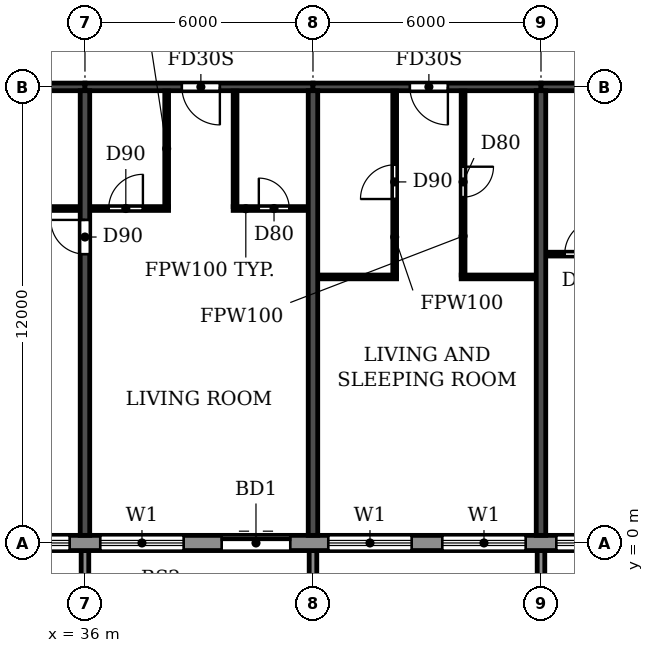
"""IFC4 building model, lengths in metres.
Left out: names, types, materials, properties, quantities, classifications, styles, units other than length and angle.
Written with IfcOpenShell. Run it as: python <this file> out.ifc"""

import sys

from ifc_helpers import new_model, si_unit, direction, frame, frame_2d, origin, place, context, subcontext, project, spatial, polyline, rectangle, outline, extrude, source, transform, mapped, element, fill, save


model = new_model("IFC4")
c1 = context("Model", 3, precision=1e-05, world=origin(), true_north=direction((0.0, 1.0)))
c2 = subcontext(c1, "Body", "Model", "MODEL_VIEW")
j1 = project(units=[si_unit("LENGTHUNIT", "METRE"), si_unit("PLANEANGLEUNIT", "RADIAN")], contexts=[c1])
p1 = place(None, origin())
s1 = spatial("IfcSite", under=j1, at=p1, CompositionType="ELEMENT")
p2 = place(p1, origin())
s2 = spatial("IfcBuilding", under=s1, at=p2, CompositionType="ELEMENT")
p3 = place(p2, frame((0.0, 0.0, 251.1)))
s3 = spatial("IfcBuildingStorey", under=s2, at=p3, CompositionType="ELEMENT", Elevation=251.1)
p4 = place(p3, frame((36.0, 0.2, 0.0), z_axis=(0.0, 0.0, 1.0), x_axis=(0.0, 1.0, 0.0)))
e1 = element("IfcWall", 1, at=p4, inside=s3, PredefinedType="SHEAR", context=c2, shape_type="SweptSolid", body=[
    extrude(rectangle(XDim=11.7, YDim=0.25, at=frame_2d((5.85, 0.0))), origin(), (0.0, 0.0, 1.0), 3.08),
])
p5 = place(p4, frame((7.4, 0.0, 0.0)))
e2 = element("IfcOpeningElement", 2, at=p5, cuts=e1, PredefinedType="OPENING", context=c2, shape_type="SweptSolid", body=[
    extrude(rectangle(XDim=0.9, YDim=2.1, at=frame_2d((0.45, 1.05))), frame((0.0, 0.135, 0.0), z_axis=(0.0, -1.0, 0.0), x_axis=(1.0, 0.0, 0.0)), (0.0, 0.0, 1.0), 0.27),
])
for number, where, z_axis, x_axis in (
    (3, (42.0, 0.2, 0.0), (0.0, 0.0, 1.0), (0.0, 1.0, 0.0)),
    (4, (48.0, 0.2, 0.0), (0.0, 0.0, 1.0), (0.0, 1.0, 0.0)),
):
    element("IfcWall", number, at=place(p3, frame(where, z_axis=z_axis, x_axis=x_axis)), inside=s3, PredefinedType="SHEAR", context=c2, shape_type="SweptSolid", body=[
        extrude(rectangle(XDim=11.7, YDim=0.25, at=frame_2d((5.85, 0.0))), origin(), (0.0, 0.0, 1.0), 3.08),
    ])
p6 = place(p3, frame((30.0, 12.0, 0.0), z_axis=(0.0, 0.0, 1.0), x_axis=(1.0, 0.0, 0.0)))
e5 = element("IfcWall", 5, at=p6, inside=s3, PredefinedType="SHEAR", context=c2, shape_type="SweptSolid", body=[
    extrude(rectangle(XDim=6.0, YDim=0.2, at=frame_2d((3.0, 0.0))), origin(), (0.0, 0.0, 1.0), 2.48),
])
p7 = place(p3, frame((36.0, 12.0, 0.0), z_axis=(0.0, 0.0, 1.0), x_axis=(1.0, 0.0, 0.0)))
e6 = element("IfcWall", 6, at=p7, inside=s3, PredefinedType="SHEAR", context=c2, shape_type="SweptSolid", body=[
    extrude(rectangle(XDim=6.0, YDim=0.2, at=frame_2d((3.0, 0.0))), origin(), (0.0, 0.0, 1.0), 2.48),
])
p8 = place(p7, frame((2.55, 0.0, 0.0)))
e7 = element("IfcOpeningElement", 7, at=p8, cuts=e6, PredefinedType="OPENING", context=c2, shape_type="SweptSolid", body=[
    extrude(rectangle(XDim=1.0, YDim=2.1, at=frame_2d((0.5, 1.05))), frame((0.0, 0.11, 0.0), z_axis=(0.0, -1.0, 0.0), x_axis=(1.0, 0.0, 0.0)), (0.0, 0.0, 1.0), 0.22),
])
p9 = place(p3, frame((42.0, 12.0, 0.0), z_axis=(0.0, 0.0, 1.0), x_axis=(1.0, 0.0, 0.0)))
e8 = element("IfcWall", 8, at=p9, inside=s3, PredefinedType="SHEAR", context=c2, shape_type="SweptSolid", body=[
    extrude(rectangle(XDim=6.0, YDim=0.2, at=frame_2d((3.0, 0.0))), origin(), (0.0, 0.0, 1.0), 2.48),
])
p10 = place(p9, frame((2.55, 0.0, 0.0)))
e9 = element("IfcOpeningElement", 9, at=p10, cuts=e8, PredefinedType="OPENING", context=c2, shape_type="SweptSolid", body=[
    extrude(rectangle(XDim=1.0, YDim=2.1, at=frame_2d((0.5, 1.05))), frame((0.0, 0.11, 0.0), z_axis=(0.0, -1.0, 0.0), x_axis=(1.0, 0.0, 0.0)), (0.0, 0.0, 1.0), 0.22),
])
p11 = place(p3, frame((48.0, 12.0, 0.0), z_axis=(0.0, 0.0, 1.0), x_axis=(1.0, 0.0, 0.0)))
e10 = element("IfcWall", 10, at=p11, inside=s3, PredefinedType="SHEAR", context=c2, shape_type="SweptSolid", body=[
    extrude(rectangle(XDim=6.0, YDim=0.2, at=frame_2d((3.0, 0.0))), origin(), (0.0, 0.0, 1.0), 2.48),
])
p12 = place(p11, frame((2.55, 0.0, 0.0)))
e11 = element("IfcOpeningElement", 11, at=p12, cuts=e10, PredefinedType="OPENING", context=c2, shape_type="SweptSolid", body=[
    extrude(rectangle(XDim=1.0, YDim=2.1, at=frame_2d((0.5, 1.05))), frame((0.0, 0.11, 0.0), z_axis=(0.0, -1.0, 0.0), x_axis=(1.0, 0.0, 0.0)), (0.0, 0.0, 1.0), 0.22),
])
p13 = place(p3, frame((22.683, 0.0, 0.0), z_axis=(0.0, 0.0, 1.0), x_axis=(1.0, 0.0, 0.0)))
e12 = element("IfcWall", 12, at=p13, inside=s3, PredefinedType="STANDARD", context=c2, shape_type="SweptSolid", body=[
    extrude(rectangle(XDim=56.634, YDim=0.4, at=frame_2d((28.317, 0.0))), origin(), (0.0, 0.0, 1.0), 3.08),
])
p14 = place(p13, frame((1.717, 0.0, 0.9)))
e13 = element("IfcOpeningElement", 13, at=p14, cuts=e12, PredefinedType="OPENING", context=c2, shape_type="SweptSolid", body=[
    extrude(rectangle(XDim=2.2, YDim=1.5, at=frame_2d((1.1, 0.75))), frame((0.0, 0.21, 0.0), z_axis=(0.0, -1.0, 0.0), x_axis=(1.0, 0.0, 0.0)), (0.0, 0.0, 1.0), 0.42),
])
p15 = place(p13, frame((4.917, 0.0, 0.0)))
e14 = element("IfcOpeningElement", 14, at=p15, cuts=e12, PredefinedType="OPENING", context=c2, shape_type="SweptSolid", body=[
    extrude(rectangle(XDim=1.8, YDim=2.4, at=frame_2d((0.9, 1.2))), frame((0.0, 0.21, 0.0), z_axis=(0.0, -1.0, 0.0), x_axis=(1.0, 0.0, 0.0)), (0.0, 0.0, 1.0), 0.42),
])
p16 = place(p13, frame((7.717, 0.0, 0.9)))
e15 = element("IfcOpeningElement", 15, at=p16, cuts=e12, PredefinedType="OPENING", context=c2, shape_type="SweptSolid", body=[
    extrude(rectangle(XDim=2.2, YDim=1.5, at=frame_2d((1.1, 0.75))), frame((0.0, 0.21, 0.0), z_axis=(0.0, -1.0, 0.0), x_axis=(1.0, 0.0, 0.0)), (0.0, 0.0, 1.0), 0.42),
])
p17 = place(p13, frame((10.717, 0.0, 0.9)))
e16 = element("IfcOpeningElement", 16, at=p17, cuts=e12, PredefinedType="OPENING", context=c2, shape_type="SweptSolid", body=[
    extrude(rectangle(XDim=2.2, YDim=1.5, at=frame_2d((1.1, 0.75))), frame((0.0, 0.21, 0.0), z_axis=(0.0, -1.0, 0.0), x_axis=(1.0, 0.0, 0.0)), (0.0, 0.0, 1.0), 0.42),
])
p18 = place(p13, frame((13.717, 0.0, 0.9)))
e17 = element("IfcOpeningElement", 17, at=p18, cuts=e12, PredefinedType="OPENING", context=c2, shape_type="SweptSolid", body=[
    extrude(rectangle(XDim=2.2, YDim=1.5, at=frame_2d((1.1, 0.75))), frame((0.0, 0.21, 0.0), z_axis=(0.0, -1.0, 0.0), x_axis=(1.0, 0.0, 0.0)), (0.0, 0.0, 1.0), 0.42),
])
p19 = place(p13, frame((16.917, 0.0, 0.0)))
e18 = element("IfcOpeningElement", 18, at=p19, cuts=e12, PredefinedType="OPENING", context=c2, shape_type="SweptSolid", body=[
    extrude(rectangle(XDim=1.8, YDim=2.4, at=frame_2d((0.9, 1.2))), frame((0.0, 0.21, 0.0), z_axis=(0.0, -1.0, 0.0), x_axis=(1.0, 0.0, 0.0)), (0.0, 0.0, 1.0), 0.42),
])
p20 = place(p13, frame((19.717, 0.0, 0.9)))
e19 = element("IfcOpeningElement", 19, at=p20, cuts=e12, PredefinedType="OPENING", context=c2, shape_type="SweptSolid", body=[
    extrude(rectangle(XDim=2.2, YDim=1.5, at=frame_2d((1.1, 0.75))), frame((0.0, 0.21, 0.0), z_axis=(0.0, -1.0, 0.0), x_axis=(1.0, 0.0, 0.0)), (0.0, 0.0, 1.0), 0.42),
])
p21 = place(p13, frame((22.717, 0.0, 0.9)))
e20 = element("IfcOpeningElement", 20, at=p21, cuts=e12, PredefinedType="OPENING", context=c2, shape_type="SweptSolid", body=[
    extrude(rectangle(XDim=2.2, YDim=1.5, at=frame_2d((1.1, 0.75))), frame((0.0, 0.21, 0.0), z_axis=(0.0, -1.0, 0.0), x_axis=(1.0, 0.0, 0.0)), (0.0, 0.0, 1.0), 0.42),
])
p22 = place(p13, frame((25.717, 0.0, 0.9)))
e21 = element("IfcOpeningElement", 21, at=p22, cuts=e12, PredefinedType="OPENING", context=c2, shape_type="SweptSolid", body=[
    extrude(rectangle(XDim=2.2, YDim=1.5, at=frame_2d((1.1, 0.75))), frame((0.0, 0.21, 0.0), z_axis=(0.0, -1.0, 0.0), x_axis=(1.0, 0.0, 0.0)), (0.0, 0.0, 1.0), 0.42),
])
p23 = place(p13, frame((28.917, 0.0, 0.0)))
e22 = element("IfcOpeningElement", 22, at=p23, cuts=e12, PredefinedType="OPENING", context=c2, shape_type="SweptSolid", body=[
    extrude(rectangle(XDim=1.8, YDim=2.4, at=frame_2d((0.9, 1.2))), frame((0.0, 0.21, 0.0), z_axis=(0.0, -1.0, 0.0), x_axis=(1.0, 0.0, 0.0)), (0.0, 0.0, 1.0), 0.42),
])
p24 = place(p13, frame((31.717, 0.0, 0.9)))
e23 = element("IfcOpeningElement", 23, at=p24, cuts=e12, PredefinedType="OPENING", context=c2, shape_type="SweptSolid", body=[
    extrude(rectangle(XDim=2.2, YDim=1.5, at=frame_2d((1.1, 0.75))), frame((0.0, 0.21, 0.0), z_axis=(0.0, -1.0, 0.0), x_axis=(1.0, 0.0, 0.0)), (0.0, 0.0, 1.0), 0.42),
])
p25 = place(p13, frame((34.717, 0.0, 0.9)))
e24 = element("IfcOpeningElement", 24, at=p25, cuts=e12, PredefinedType="OPENING", context=c2, shape_type="SweptSolid", body=[
    extrude(rectangle(XDim=2.2, YDim=1.5, at=frame_2d((1.1, 0.75))), frame((0.0, 0.21, 0.0), z_axis=(0.0, -1.0, 0.0), x_axis=(1.0, 0.0, 0.0)), (0.0, 0.0, 1.0), 0.42),
])
p26 = place(p13, frame((37.717, 0.0, 0.9)))
e25 = element("IfcOpeningElement", 25, at=p26, cuts=e12, PredefinedType="OPENING", context=c2, shape_type="SweptSolid", body=[
    extrude(rectangle(XDim=2.2, YDim=1.5, at=frame_2d((1.1, 0.75))), frame((0.0, 0.21, 0.0), z_axis=(0.0, -1.0, 0.0), x_axis=(1.0, 0.0, 0.0)), (0.0, 0.0, 1.0), 0.42),
])
p27 = place(p13, frame((40.917, 0.0, 0.0)))
e26 = element("IfcOpeningElement", 26, at=p27, cuts=e12, PredefinedType="OPENING", context=c2, shape_type="SweptSolid", body=[
    extrude(rectangle(XDim=1.8, YDim=2.4, at=frame_2d((0.9, 1.2))), frame((0.0, 0.21, 0.0), z_axis=(0.0, -1.0, 0.0), x_axis=(1.0, 0.0, 0.0)), (0.0, 0.0, 1.0), 0.42),
])
p28 = place(p13, frame((43.717, 0.0, 0.9)))
e27 = element("IfcOpeningElement", 27, at=p28, cuts=e12, PredefinedType="OPENING", context=c2, shape_type="SweptSolid", body=[
    extrude(rectangle(XDim=2.2, YDim=1.5, at=frame_2d((1.1, 0.75))), frame((0.0, 0.21, 0.0), z_axis=(0.0, -1.0, 0.0), x_axis=(1.0, 0.0, 0.0)), (0.0, 0.0, 1.0), 0.42),
])
p29 = place(p13, frame((46.717, 0.0, 0.9)))
e28 = element("IfcOpeningElement", 28, at=p29, cuts=e12, PredefinedType="OPENING", context=c2, shape_type="SweptSolid", body=[
    extrude(rectangle(XDim=2.2, YDim=1.5, at=frame_2d((1.1, 0.75))), frame((0.0, 0.21, 0.0), z_axis=(0.0, -1.0, 0.0), x_axis=(1.0, 0.0, 0.0)), (0.0, 0.0, 1.0), 0.42),
])
p30 = place(p13, frame((49.717, 0.0, 0.9)))
e29 = element("IfcOpeningElement", 29, at=p30, cuts=e12, PredefinedType="OPENING", context=c2, shape_type="SweptSolid", body=[
    extrude(rectangle(XDim=2.2, YDim=1.5, at=frame_2d((1.1, 0.75))), frame((0.0, 0.21, 0.0), z_axis=(0.0, -1.0, 0.0), x_axis=(1.0, 0.0, 0.0)), (0.0, 0.0, 1.0), 0.42),
])
p31 = place(p13, frame((52.917, 0.0, 0.0)))
e30 = element("IfcOpeningElement", 30, at=p31, cuts=e12, PredefinedType="OPENING", context=c2, shape_type="SweptSolid", body=[
    extrude(rectangle(XDim=1.8, YDim=2.4, at=frame_2d((0.9, 1.2))), frame((0.0, 0.21, 0.0), z_axis=(0.0, -1.0, 0.0), x_axis=(1.0, 0.0, 0.0)), (0.0, 0.0, 1.0), 0.42),
])
m1 = source(origin(), c2, "Body", "SweptSolid", [
    extrude(outline(polyline([(0.0, 0.0), (0.2, 0.0), (0.2, 1.65), (0.0, 1.65), (0.0, 0.0)])), origin(), (0.0, 0.0, 1.0), 3.1),
])
for number, where in (
    (31, (35.9, -1.85, 0.0)),
    (32, (41.9, -1.85, 0.0)),
    (33, (47.9, -1.85, 0.0)),
):
    element("IfcWall", number, at=place(p3, frame(where)), inside=s3, PredefinedType="STANDARD", context=c2, shape_type="MappedRepresentation", body=[
        mapped(m1, transform((0.0, 0.0, 0.0))),
    ])
p32 = place(p3, frame((42.135, 7.0, 0.0), z_axis=(0.0, 0.0, 1.0), x_axis=(1.0, 0.0, 0.0)))
e34 = element("IfcWall", 34, at=p32, inside=s3, PredefinedType="PARTITIONING", context=c2, shape_type="SweptSolid", body=[
    extrude(rectangle(XDim=2.065, YDim=0.1, at=frame_2d((1.032, 0.0))), origin(), (0.0, 0.0, 1.0), 3.08),
])
p33 = place(p3, frame((45.9, 7.0, 0.0), z_axis=(0.0, 0.0, 1.0), x_axis=(1.0, 0.0, 0.0)))
e35 = element("IfcWall", 35, at=p33, inside=s3, PredefinedType="PARTITIONING", context=c2, shape_type="SweptSolid", body=[
    extrude(rectangle(XDim=1.965, YDim=0.1, at=frame_2d((0.982, 0.0))), origin(), (0.0, 0.0, 1.0), 3.08),
])
p34 = place(p3, frame((48.135, 7.6, 0.0), z_axis=(0.0, 0.0, 1.0), x_axis=(1.0, 0.0, 0.0)))
e36 = element("IfcWall", 36, at=p34, inside=s3, PredefinedType="PARTITIONING", context=c2, shape_type="SweptSolid", body=[
    extrude(rectangle(XDim=2.065, YDim=0.1, at=frame_2d((1.032, 0.0))), origin(), (0.0, 0.0, 1.0), 3.08),
])
p35 = place(p34, frame((0.49, 0.0, 0.0)))
e37 = element("IfcOpeningElement", 37, at=p35, cuts=e36, PredefinedType="OPENING", context=c2, shape_type="SweptSolid", body=[
    extrude(rectangle(XDim=0.9, YDim=2.1, at=frame_2d((0.45, 1.05))), frame((0.0, 0.06, 0.0), z_axis=(0.0, -1.0, 0.0), x_axis=(1.0, 0.0, 0.0)), (0.0, 0.0, 1.0), 0.12),
])
p36 = place(p3, frame((33.1, 8.8, 0.0), z_axis=(0.0, 0.0, 1.0), x_axis=(1.0, 0.0, 0.0)))
e38 = element("IfcWall", 38, at=p36, inside=s3, PredefinedType="PARTITIONING", context=c2, shape_type="SweptSolid", body=[
    extrude(rectangle(XDim=2.765, YDim=0.1, at=frame_2d((1.382, 0.0))), origin(), (0.0, 0.0, 1.0), 3.08),
])
p37 = place(p36, frame((1.0, 0.0, 0.0)))
e39 = element("IfcOpeningElement", 39, at=p37, cuts=e38, PredefinedType="OPENING", context=c2, shape_type="SweptSolid", body=[
    extrude(rectangle(XDim=0.8, YDim=2.1, at=frame_2d((0.4, 1.05))), frame((0.0, 0.06, 0.0), z_axis=(0.0, -1.0, 0.0), x_axis=(1.0, 0.0, 0.0)), (0.0, 0.0, 1.0), 0.12),
])
p38 = place(p3, frame((36.135, 8.8, 0.0), z_axis=(0.0, 0.0, 1.0), x_axis=(1.0, 0.0, 0.0)))
e40 = element("IfcWall", 40, at=p38, inside=s3, PredefinedType="PARTITIONING", context=c2, shape_type="SweptSolid", body=[
    extrude(rectangle(XDim=2.065, YDim=0.1, at=frame_2d((1.032, 0.0))), origin(), (0.0, 0.0, 1.0), 3.08),
])
p39 = place(p38, frame((0.49, 0.0, 0.0)))
e41 = element("IfcOpeningElement", 41, at=p39, cuts=e40, PredefinedType="OPENING", context=c2, shape_type="SweptSolid", body=[
    extrude(rectangle(XDim=0.9, YDim=2.1, at=frame_2d((0.45, 1.05))), frame((0.0, 0.06, 0.0), z_axis=(0.0, -1.0, 0.0), x_axis=(1.0, 0.0, 0.0)), (0.0, 0.0, 1.0), 0.12),
])
p40 = place(p3, frame((39.9, 8.8, 0.0), z_axis=(0.0, 0.0, 1.0), x_axis=(1.0, 0.0, 0.0)))
e42 = element("IfcWall", 42, at=p40, inside=s3, PredefinedType="PARTITIONING", context=c2, shape_type="SweptSolid", body=[
    extrude(rectangle(XDim=1.965, YDim=0.1, at=frame_2d((0.982, 0.0))), origin(), (0.0, 0.0, 1.0), 3.08),
])
p41 = place(p40, frame((0.675, 0.0, 0.0)))
e43 = element("IfcOpeningElement", 43, at=p41, cuts=e42, PredefinedType="OPENING", context=c2, shape_type="SweptSolid", body=[
    extrude(rectangle(XDim=0.8, YDim=2.1, at=frame_2d((0.4, 1.05))), frame((0.0, 0.06, 0.0), z_axis=(0.0, -1.0, 0.0), x_axis=(1.0, 0.0, 0.0)), (0.0, 0.0, 1.0), 0.12),
])
for number, where, z_axis, x_axis in (
    (44, (38.15, 8.85, 0.0), (0.0, 0.0, 1.0), (0.0, 1.0, 0.0)),
    (45, (39.95, 8.85, 0.0), (0.0, 0.0, 1.0), (0.0, 1.0, 0.0)),
):
    element("IfcWall", number, at=place(p3, frame(where, z_axis=z_axis, x_axis=x_axis)), inside=s3, PredefinedType="PARTITIONING", context=c2, shape_type="SweptSolid", body=[
        extrude(rectangle(XDim=3.04, YDim=0.1, at=frame_2d((1.52, 0.0))), origin(), (0.0, 0.0, 1.0), 3.08),
    ])
p42 = place(p3, frame((44.15, 7.05, 0.0), z_axis=(0.0, 0.0, 1.0), x_axis=(0.0, 1.0, 0.0)))
e46 = element("IfcWall", 46, at=p42, inside=s3, PredefinedType="PARTITIONING", context=c2, shape_type="SweptSolid", body=[
    extrude(rectangle(XDim=4.84, YDim=0.1, at=frame_2d((2.42, 0.0))), origin(), (0.0, 0.0, 1.0), 3.08),
])
p43 = place(p42, frame((2.0, 0.0, 0.0)))
e47 = element("IfcOpeningElement", 47, at=p43, cuts=e46, PredefinedType="OPENING", context=c2, shape_type="SweptSolid", body=[
    extrude(rectangle(XDim=0.9, YDim=2.1, at=frame_2d((0.45, 1.05))), frame((0.0, 0.06, 0.0), z_axis=(0.0, -1.0, 0.0), x_axis=(1.0, 0.0, 0.0)), (0.0, 0.0, 1.0), 0.12),
])
p44 = place(p3, frame((45.95, 7.05, 0.0), z_axis=(0.0, 0.0, 1.0), x_axis=(0.0, 1.0, 0.0)))
e48 = element("IfcWall", 48, at=p44, inside=s3, PredefinedType="PARTITIONING", context=c2, shape_type="SweptSolid", body=[
    extrude(rectangle(XDim=4.84, YDim=0.1, at=frame_2d((2.42, 0.0))), origin(), (0.0, 0.0, 1.0), 3.08),
])
p45 = place(p44, frame((2.05, 0.0, 0.0)))
e49 = element("IfcOpeningElement", 49, at=p45, cuts=e48, PredefinedType="OPENING", context=c2, shape_type="SweptSolid", body=[
    extrude(rectangle(XDim=0.8, YDim=2.1, at=frame_2d((0.4, 1.05))), frame((0.0, 0.06, 0.0), z_axis=(0.0, -1.0, 0.0), x_axis=(1.0, 0.0, 0.0)), (0.0, 0.0, 1.0), 0.12),
])
p46 = place(p17, origin())
e50 = element("IfcWindow", 50, at=p46, inside=s3, PartitioningType="DOUBLE_PANEL_HORIZONTAL", PredefinedType="WINDOW", context=c2, shape_type="SweptSolid", body=[
    extrude(rectangle(XDim=2.2, YDim=1.5, at=frame_2d((1.1, 0.75))), frame((0.0, 0.03, 0.0), z_axis=(0.0, -1.0, 0.0), x_axis=(1.0, 0.0, 0.0)), (0.0, 0.0, 1.0), 0.06),
])
fill(e16, e50)
p47 = place(p18, origin())
e51 = element("IfcWindow", 51, at=p47, inside=s3, PartitioningType="DOUBLE_PANEL_HORIZONTAL", PredefinedType="WINDOW", context=c2, shape_type="SweptSolid", body=[
    extrude(rectangle(XDim=2.2, YDim=1.5, at=frame_2d((1.1, 0.75))), frame((0.0, 0.03, 0.0), z_axis=(0.0, -1.0, 0.0), x_axis=(1.0, 0.0, 0.0)), (0.0, 0.0, 1.0), 0.06),
])
fill(e17, e51)
p48 = place(p19, origin())
e52 = element("IfcDoor", 52, at=p48, inside=s3, OperationType="DOUBLE_DOOR_SLIDING", PredefinedType="DOOR", context=c2, shape_type="SweptSolid", body=[
    extrude(rectangle(XDim=1.8, YDim=2.4, at=frame_2d((0.9, 1.2))), frame((0.0, 0.025, 0.0), z_axis=(0.0, -1.0, 0.0), x_axis=(1.0, 0.0, 0.0)), (0.0, 0.0, 1.0), 0.05),
])
fill(e18, e52)
p49 = place(p20, origin())
e53 = element("IfcWindow", 53, at=p49, inside=s3, PartitioningType="DOUBLE_PANEL_HORIZONTAL", PredefinedType="WINDOW", context=c2, shape_type="SweptSolid", body=[
    extrude(rectangle(XDim=2.2, YDim=1.5, at=frame_2d((1.1, 0.75))), frame((0.0, 0.03, 0.0), z_axis=(0.0, -1.0, 0.0), x_axis=(1.0, 0.0, 0.0)), (0.0, 0.0, 1.0), 0.06),
])
fill(e19, e53)
p50 = place(p21, origin())
e54 = element("IfcWindow", 54, at=p50, inside=s3, PartitioningType="DOUBLE_PANEL_HORIZONTAL", PredefinedType="WINDOW", context=c2, shape_type="SweptSolid", body=[
    extrude(rectangle(XDim=2.2, YDim=1.5, at=frame_2d((1.1, 0.75))), frame((0.0, 0.03, 0.0), z_axis=(0.0, -1.0, 0.0), x_axis=(1.0, 0.0, 0.0)), (0.0, 0.0, 1.0), 0.06),
])
fill(e20, e54)
p51 = place(p22, origin())
e55 = element("IfcWindow", 55, at=p51, inside=s3, PartitioningType="DOUBLE_PANEL_HORIZONTAL", PredefinedType="WINDOW", context=c2, shape_type="SweptSolid", body=[
    extrude(rectangle(XDim=2.2, YDim=1.5, at=frame_2d((1.1, 0.75))), frame((0.0, 0.03, 0.0), z_axis=(0.0, -1.0, 0.0), x_axis=(1.0, 0.0, 0.0)), (0.0, 0.0, 1.0), 0.06),
])
fill(e21, e55)
p52 = place(p5, origin())
e56 = element("IfcDoor", 56, at=p52, inside=s3, OperationType="SINGLE_SWING_RIGHT", PredefinedType="DOOR", context=c2, shape_type="SweptSolid", body=[
    extrude(rectangle(XDim=0.9, YDim=2.1, at=frame_2d((0.45, 1.05))), frame((0.0, 0.025, 0.0), z_axis=(0.0, -1.0, 0.0), x_axis=(1.0, 0.0, 0.0)), (0.0, 0.0, 1.0), 0.05),
])
fill(e2, e56)
p53 = place(p39, origin())
e57 = element("IfcDoor", 57, at=p53, inside=s3, OperationType="SINGLE_SWING_RIGHT", PredefinedType="DOOR", context=c2, shape_type="SweptSolid", body=[
    extrude(rectangle(XDim=0.9, YDim=2.1, at=frame_2d((0.45, 1.05))), frame((0.0, 0.025, 0.0), z_axis=(0.0, -1.0, 0.0), x_axis=(1.0, 0.0, 0.0)), (0.0, 0.0, 1.0), 0.05),
])
fill(e41, e57)
p54 = place(p8, frame((1.0, 0.0, 0.0), z_axis=(0.0, 0.0, 1.0), x_axis=(-1.0, 0.0, 0.0)))
e58 = element("IfcDoor", 58, at=p54, inside=s3, OperationType="SINGLE_SWING_LEFT", PredefinedType="DOOR", context=c2, shape_type="SweptSolid", body=[
    extrude(rectangle(XDim=1.0, YDim=2.1, at=frame_2d((0.5, 1.05))), frame((0.0, 0.025, 0.0), z_axis=(0.0, -1.0, 0.0), x_axis=(1.0, 0.0, 0.0)), (0.0, 0.0, 1.0), 0.05),
])
fill(e7, e58)
p55 = place(p41, origin())
e59 = element("IfcDoor", 59, at=p55, inside=s3, OperationType="SINGLE_SWING_LEFT", PredefinedType="DOOR", context=c2, shape_type="SweptSolid", body=[
    extrude(rectangle(XDim=0.8, YDim=2.1, at=frame_2d((0.4, 1.05))), frame((0.0, 0.025, 0.0), z_axis=(0.0, -1.0, 0.0), x_axis=(1.0, 0.0, 0.0)), (0.0, 0.0, 1.0), 0.05),
])
fill(e43, e59)
p56 = place(p43, origin())
e60 = element("IfcDoor", 60, at=p56, inside=s3, OperationType="SINGLE_SWING_LEFT", PredefinedType="DOOR", context=c2, shape_type="SweptSolid", body=[
    extrude(rectangle(XDim=0.9, YDim=2.1, at=frame_2d((0.45, 1.05))), frame((0.0, 0.025, 0.0), z_axis=(0.0, -1.0, 0.0), x_axis=(1.0, 0.0, 0.0)), (0.0, 0.0, 1.0), 0.05),
])
fill(e47, e60)
p57 = place(p10, frame((1.0, 0.0, 0.0), z_axis=(0.0, 0.0, 1.0), x_axis=(-1.0, 0.0, 0.0)))
e61 = element("IfcDoor", 61, at=p57, inside=s3, OperationType="SINGLE_SWING_LEFT", PredefinedType="DOOR", context=c2, shape_type="SweptSolid", body=[
    extrude(rectangle(XDim=1.0, YDim=2.1, at=frame_2d((0.5, 1.05))), frame((0.0, 0.025, 0.0), z_axis=(0.0, -1.0, 0.0), x_axis=(1.0, 0.0, 0.0)), (0.0, 0.0, 1.0), 0.05),
])
fill(e9, e61)
p58 = place(p45, frame((0.8, 0.0, 0.0), z_axis=(0.0, 0.0, 1.0), x_axis=(-1.0, 0.0, 0.0)))
e62 = element("IfcDoor", 62, at=p58, inside=s3, OperationType="SINGLE_SWING_LEFT", PredefinedType="DOOR", context=c2, shape_type="SweptSolid", body=[
    extrude(rectangle(XDim=0.8, YDim=2.1, at=frame_2d((0.4, 1.05))), frame((0.0, 0.025, 0.0), z_axis=(0.0, -1.0, 0.0), x_axis=(1.0, 0.0, 0.0)), (0.0, 0.0, 1.0), 0.05),
])
fill(e49, e62)
p59 = place(p35, origin())
e63 = element("IfcDoor", 63, at=p59, inside=s3, OperationType="SINGLE_SWING_RIGHT", PredefinedType="DOOR", context=c2, shape_type="SweptSolid", body=[
    extrude(rectangle(XDim=0.9, YDim=2.1, at=frame_2d((0.45, 1.05))), frame((0.0, 0.025, 0.0), z_axis=(0.0, -1.0, 0.0), x_axis=(1.0, 0.0, 0.0)), (0.0, 0.0, 1.0), 0.05),
])
fill(e37, e63)
save(model, sys.argv[1])
